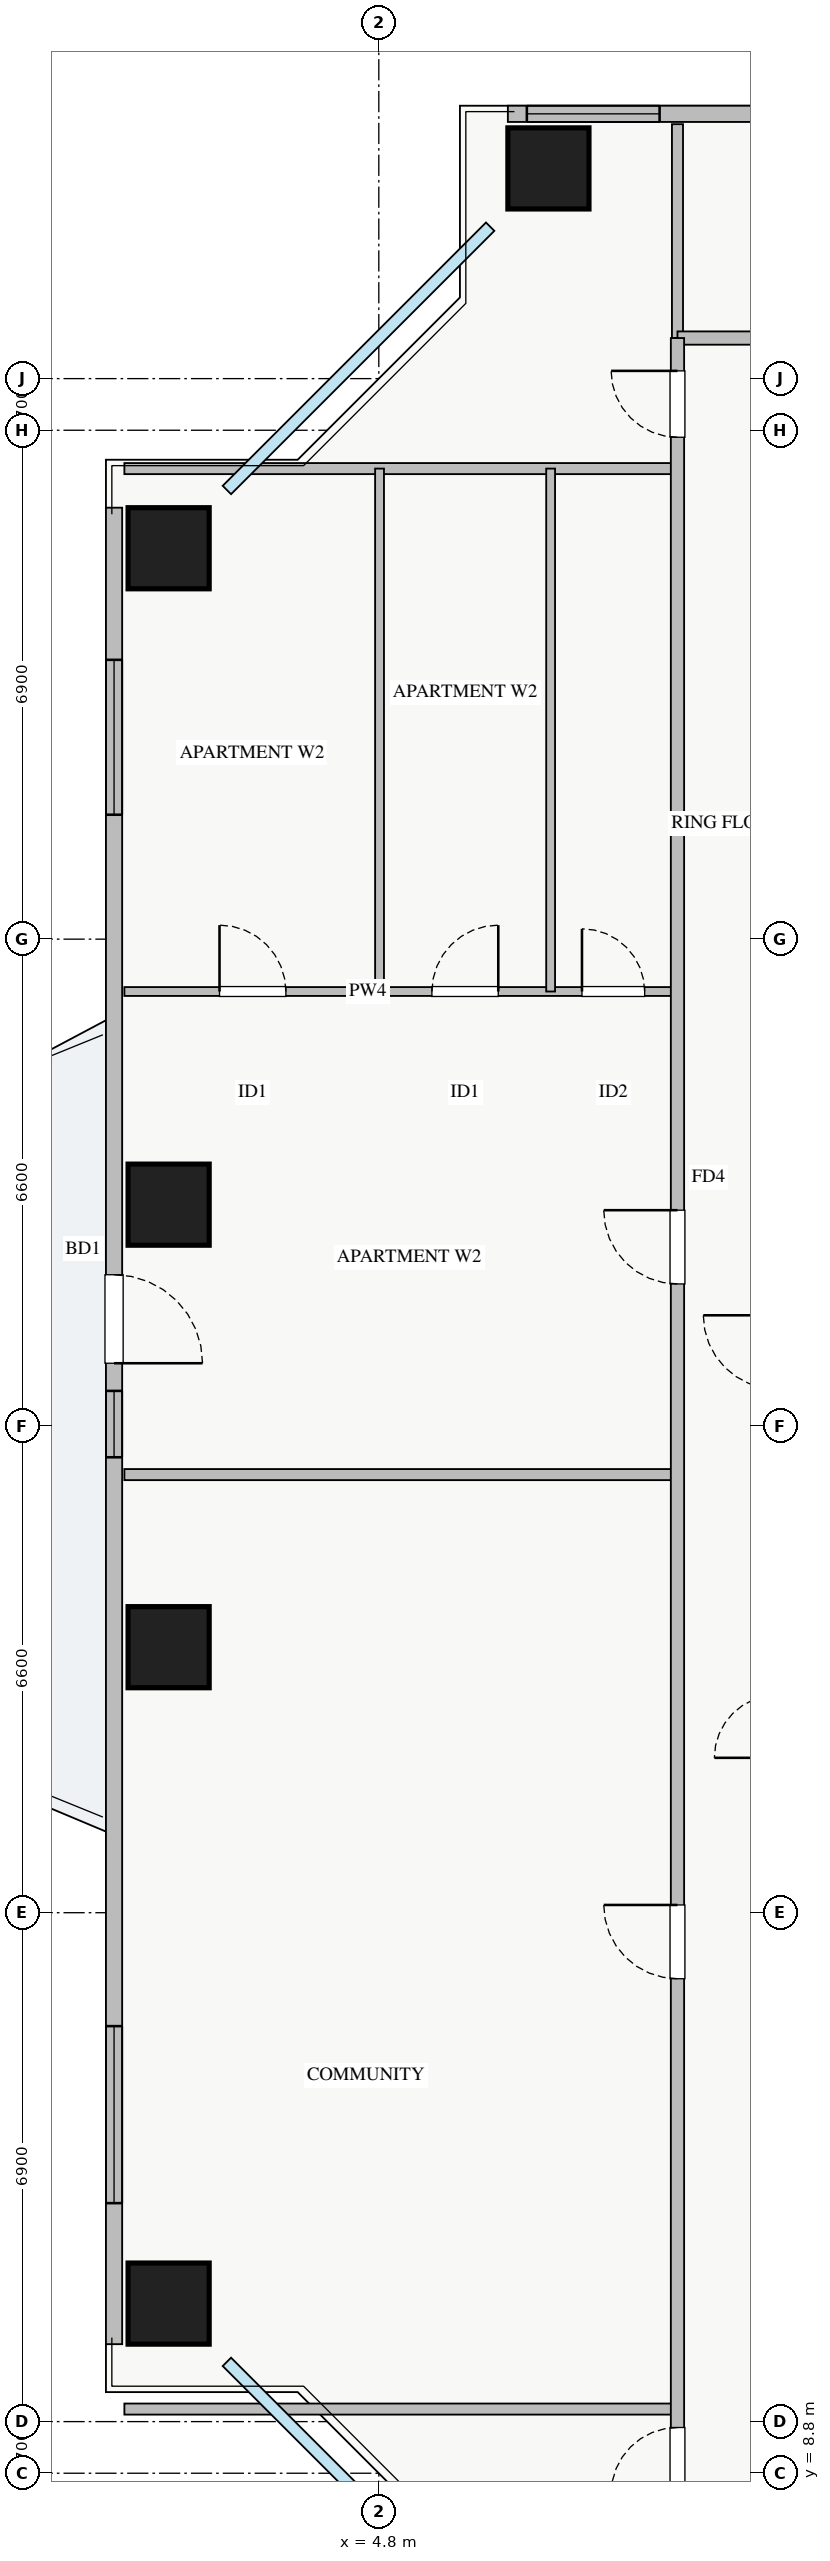
"""IFC4 building model, lengths in metres.
Left out: names, types, materials, properties, quantities, classifications, styles, units other than length and angle.
Written with IfcOpenShell. Run it as: python <this file> out.ifc"""

import sys

from ifc_helpers import new_model, si_unit, direction, frame, frame_2d, origin, origin_2d, place, context, subcontext, project, spatial, rectangle, extrude, source, transform, mapped, element, fill, save


model = new_model("IFC4")
c1 = context("Model", 3, precision=1e-05, world=origin(), true_north=direction((0.0, 1.0)))
c2 = subcontext(c1, "Body", "Model", "MODEL_VIEW")
j1 = project(units=[si_unit("LENGTHUNIT", "METRE"), si_unit("PLANEANGLEUNIT", "RADIAN")], contexts=[c1])
p1 = place(None, origin())
s1 = spatial("IfcSite", under=j1, at=p1, CompositionType="ELEMENT")
p2 = place(p1, origin())
s2 = spatial("IfcBuilding", under=s1, at=p2, CompositionType="ELEMENT")
p3 = place(p2, frame((0.0, 0.0, 116.5)))
s3 = spatial("IfcBuildingStorey", under=s2, at=p3, CompositionType="ELEMENT", Elevation=116.5)
m1 = source(origin(), c2, "Body", "SweptSolid", [
    extrude(rectangle(XDim=1.1, YDim=1.1, at=origin_2d()), origin(), (0.0, 0.0, 1.0), 3.25),
])
for number, where, z_axis, x_axis in (
    (1, (7.1, 40.05, 0.0), (0.0, 0.0, 1.0), (1.0, 0.0, 0.0)),
    (2, (1.95, 34.9, 0.0), (0.0, 0.0, 1.0), (1.0, 0.0, 0.0)),
    (3, (1.95, 26.0, 0.0), (0.0, 0.0, 1.0), (1.0, 0.0, 0.0)),
    (4, (1.95, 20.0, 0.0), (0.0, 0.0, 1.0), (1.0, 0.0, 0.0)),
    (5, (1.95, 11.1, 0.0), (0.0, 0.0, 1.0), (1.0, 0.0, 0.0)),
):
    element("IfcColumn", number, at=place(p3, frame(where, z_axis=z_axis, x_axis=x_axis)), inside=s3, PredefinedType="COLUMN", context=c2, shape_type="MappedRepresentation", body=[
        mapped(m1, transform((0.0, 0.0, 0.0), x_axis=(1.0, 0.0, 0.0), y_axis=(0.0, 1.0, 0.0), z_axis=(0.0, 0.0, 1.0), scale=1.0)),
    ])
p4 = place(p3, frame((6.55, 40.79, 0.0), z_axis=(0.0, 0.0, 1.0), x_axis=(1.0, 0.0, 0.0)))
e6 = element("IfcWall", 6, at=p4, inside=s3, PredefinedType="STANDARD", context=c2, shape_type="SweptSolid", body=[
    extrude(rectangle(XDim=24.9, YDim=0.22, at=frame_2d((12.45, 0.0))), origin(), (0.0, 0.0, 1.0), 2.61),
])
p5 = place(p4, frame((13.3, 0.0, 0.0)))
e7 = element("IfcOpeningElement", 7, at=p5, cuts=e6, PredefinedType="OPENING", context=c2, shape_type="SweptSolid", body=[
    extrude(rectangle(XDim=1.2, YDim=2.1, at=frame_2d((0.6, 1.05))), frame((0.0, 0.12, 0.0), z_axis=(0.0, -1.0, 0.0), x_axis=(1.0, 0.0, 0.0)), (0.0, 0.0, 1.0), 0.24),
])
p6 = place(p4, frame((3.635, 0.0, 0.9)))
e8 = element("IfcOpeningElement", 8, at=p6, cuts=e6, PredefinedType="OPENING", context=c2, shape_type="SweptSolid", body=[
    extrude(rectangle(XDim=2.4, YDim=1.5, at=frame_2d((1.2, 0.75))), frame((0.0, 0.12, 0.0), z_axis=(0.0, -1.0, 0.0), x_axis=(1.0, 0.0, 0.0)), (0.0, 0.0, 1.0), 0.24),
])
p7 = place(p4, frame((8.438, 0.0, 0.9)))
e9 = element("IfcOpeningElement", 9, at=p7, cuts=e6, PredefinedType="OPENING", context=c2, shape_type="SweptSolid", body=[
    extrude(rectangle(XDim=1.8, YDim=1.45, at=frame_2d((0.9, 0.725))), frame((0.0, 0.12, 0.0), z_axis=(0.0, -1.0, 0.0), x_axis=(1.0, 0.0, 0.0)), (0.0, 0.0, 1.0), 0.24),
])
p8 = place(p4, frame((14.813, 0.0, 0.9)))
e10 = element("IfcOpeningElement", 10, at=p8, cuts=e6, PredefinedType="OPENING", context=c2, shape_type="SweptSolid", body=[
    extrude(rectangle(XDim=1.5, YDim=1.45, at=frame_2d((0.75, 0.725))), frame((0.0, 0.12, 0.0), z_axis=(0.0, -1.0, 0.0), x_axis=(1.0, 0.0, 0.0)), (0.0, 0.0, 1.0), 0.24),
])
p9 = place(p4, frame((20.738, 0.0, 0.9)))
e11 = element("IfcOpeningElement", 11, at=p9, cuts=e6, PredefinedType="OPENING", context=c2, shape_type="SweptSolid", body=[
    extrude(rectangle(XDim=2.1, YDim=1.48, at=frame_2d((1.05, 0.74))), frame((0.0, 0.12, 0.0), z_axis=(0.0, -1.0, 0.0), x_axis=(1.0, 0.0, 0.0)), (0.0, 0.0, 1.0), 0.24),
])
p10 = place(p4, frame((0.258, 0.0, 0.9)))
e12 = element("IfcOpeningElement", 12, at=p10, cuts=e6, PredefinedType="OPENING", context=c2, shape_type="SweptSolid", body=[
    extrude(rectangle(XDim=1.8, YDim=1.5, at=frame_2d((0.9, 0.75))), frame((0.0, 0.12, 0.0), z_axis=(0.0, -1.0, 0.0), x_axis=(1.0, 0.0, 0.0)), (0.0, 0.0, 1.0), 0.24),
])
p11 = place(p3, frame((1.21, 10.55, 0.0), z_axis=(0.0, 0.0, 1.0), x_axis=(0.0, 1.0, 0.0)))
e13 = element("IfcWall", 13, at=p11, inside=s3, PredefinedType="STANDARD", context=c2, shape_type="SweptSolid", body=[
    extrude(rectangle(XDim=24.9, YDim=0.22, at=frame_2d((12.45, 0.0))), origin(), (0.0, 0.0, 1.0), 2.61),
])
p12 = place(p11, frame((13.3, 0.0, 0.0)))
e14 = element("IfcOpeningElement", 14, at=p12, cuts=e13, PredefinedType="OPENING", context=c2, shape_type="SweptSolid", body=[
    extrude(rectangle(XDim=1.2, YDim=2.1, at=frame_2d((0.6, 1.05))), frame((0.0, 0.12, 0.0), z_axis=(0.0, -1.0, 0.0), x_axis=(1.0, 0.0, 0.0)), (0.0, 0.0, 1.0), 0.24),
])
p13 = place(p11, frame((1.912, 0.0, 0.9)))
e15 = element("IfcOpeningElement", 15, at=p13, cuts=e13, PredefinedType="OPENING", context=c2, shape_type="SweptSolid", body=[
    extrude(rectangle(XDim=2.4, YDim=1.48, at=frame_2d((1.2, 0.74))), frame((0.0, 0.12, 0.0), z_axis=(0.0, -1.0, 0.0), x_axis=(1.0, 0.0, 0.0)), (0.0, 0.0, 1.0), 0.24),
])
p14 = place(p11, frame((20.737, 0.0, 0.9)))
e16 = element("IfcOpeningElement", 16, at=p14, cuts=e13, PredefinedType="OPENING", context=c2, shape_type="SweptSolid", body=[
    extrude(rectangle(XDim=2.1, YDim=1.48, at=frame_2d((1.05, 0.74))), frame((0.0, 0.12, 0.0), z_axis=(0.0, -1.0, 0.0), x_axis=(1.0, 0.0, 0.0)), (0.0, 0.0, 1.0), 0.24),
])
p15 = place(p11, frame((12.025, 0.0, 0.9)))
e17 = element("IfcOpeningElement", 17, at=p15, cuts=e13, PredefinedType="OPENING", context=c2, shape_type="SweptSolid", body=[
    extrude(rectangle(XDim=0.9, YDim=1.2, at=frame_2d((0.45, 0.6))), frame((0.0, 0.12, 0.0), z_axis=(0.0, -1.0, 0.0), x_axis=(1.0, 0.0, 0.0)), (0.0, 0.0, 1.0), 0.24),
])
p16 = place(p3, frame((8.85, 37.75, 0.0), z_axis=(0.0, 0.0, 1.0), x_axis=(0.0, 1.0, 0.0)))
e18 = element("IfcWall", 18, at=p16, inside=s3, PredefinedType="PARTITIONING", context=c2, shape_type="SweptSolid", body=[
    extrude(rectangle(XDim=2.9, YDim=0.15, at=frame_2d((1.45, 0.0))), origin(), (0.0, 0.0, 1.0), 3.07),
])
p17 = place(p3, frame((8.85, 37.75, 0.0), z_axis=(0.0, 0.0, 1.0), x_axis=(1.0, 0.0, 0.0)))
e19 = element("IfcWall", 19, at=p17, inside=s3, PredefinedType="PARTITIONING", context=c2, shape_type="SweptSolid", body=[
    extrude(rectangle(XDim=23.57, YDim=0.18, at=frame_2d((11.785, 0.0))), origin(), (0.0, 0.0, 1.0), 3.07),
])
p18 = place(p17, frame((2.035, 0.0, 0.0)))
e20 = element("IfcOpeningElement", 20, at=p18, cuts=e19, PredefinedType="OPENING", context=c2, shape_type="SweptSolid", body=[
    extrude(rectangle(XDim=1.0, YDim=2.05, at=frame_2d((0.5, 1.025))), frame((0.0, 0.1, 0.0), z_axis=(0.0, -1.0, 0.0), x_axis=(1.0, 0.0, 0.0)), (0.0, 0.0, 1.0), 0.2),
])
p19 = place(p17, frame((7.16, 0.0, 0.0)))
e21 = element("IfcOpeningElement", 21, at=p19, cuts=e19, PredefinedType="OPENING", context=c2, shape_type="SweptSolid", body=[
    extrude(rectangle(XDim=1.0, YDim=2.05, at=frame_2d((0.5, 1.025))), frame((0.0, 0.1, 0.0), z_axis=(0.0, -1.0, 0.0), x_axis=(1.0, 0.0, 0.0)), (0.0, 0.0, 1.0), 0.2),
])
p20 = place(p17, frame((13.3, 0.0, 0.0)))
e22 = element("IfcOpeningElement", 22, at=p20, cuts=e19, PredefinedType="OPENING", context=c2, shape_type="SweptSolid", body=[
    extrude(rectangle(XDim=1.0, YDim=2.05, at=frame_2d((0.5, 1.025))), frame((0.0, 0.1, 0.0), z_axis=(0.0, -1.0, 0.0), x_axis=(1.0, 0.0, 0.0)), (0.0, 0.0, 1.0), 0.2),
])
p21 = place(p17, frame((19.74, 0.0, 0.0)))
e23 = element("IfcOpeningElement", 23, at=p21, cuts=e19, PredefinedType="OPENING", context=c2, shape_type="SweptSolid", body=[
    extrude(rectangle(XDim=1.0, YDim=2.05, at=frame_2d((0.5, 1.025))), frame((0.0, 0.1, 0.0), z_axis=(0.0, -1.0, 0.0), x_axis=(1.0, 0.0, 0.0)), (0.0, 0.0, 1.0), 0.2),
])
for number, where, z_axis, x_axis in (
    (24, (1.35, 35.98, 0.0), (0.0, 0.0, 1.0), (1.0, 0.0, 0.0)),
    (25, (1.35, 9.67, 0.0), (0.0, 0.0, 1.0), (1.0, 0.0, 0.0)),
):
    element("IfcWall", number, at=place(p3, frame(where, z_axis=z_axis, x_axis=x_axis)), inside=s3, PredefinedType="PARTITIONING", context=c2, shape_type="SweptSolid", body=[
        extrude(rectangle(XDim=7.5, YDim=0.15, at=frame_2d((3.75, 0.0))), origin(), (0.0, 0.0, 1.0), 3.07),
    ])
p22 = place(p3, frame((1.35, 28.89, 0.0), z_axis=(0.0, 0.0, 1.0), x_axis=(1.0, 0.0, 0.0)))
e26 = element("IfcWall", 26, at=p22, inside=s3, PredefinedType="PLUMBINGWALL", context=c2, shape_type="SweptSolid", body=[
    extrude(rectangle(XDim=7.5, YDim=0.12, at=frame_2d((3.75, 0.0))), origin(), (0.0, 0.0, 1.0), 3.07),
])
p23 = place(p22, frame((1.29, 0.0, 0.0)))
e27 = element("IfcOpeningElement", 27, at=p23, cuts=e26, PredefinedType="OPENING", context=c2, shape_type="SweptSolid", body=[
    extrude(rectangle(XDim=0.9, YDim=2.05, at=frame_2d((0.45, 1.025))), frame((0.0, 0.07, 0.0), z_axis=(0.0, -1.0, 0.0), x_axis=(1.0, 0.0, 0.0)), (0.0, 0.0, 1.0), 0.14),
])
p24 = place(p22, frame((4.17, 0.0, 0.0)))
e28 = element("IfcOpeningElement", 28, at=p24, cuts=e26, PredefinedType="OPENING", context=c2, shape_type="SweptSolid", body=[
    extrude(rectangle(XDim=0.9, YDim=2.05, at=frame_2d((0.45, 1.025))), frame((0.0, 0.07, 0.0), z_axis=(0.0, -1.0, 0.0), x_axis=(1.0, 0.0, 0.0)), (0.0, 0.0, 1.0), 0.14),
])
p25 = place(p22, frame((6.205, 0.0, 0.0)))
e29 = element("IfcOpeningElement", 29, at=p25, cuts=e26, PredefinedType="OPENING", context=c2, shape_type="SweptSolid", body=[
    extrude(rectangle(XDim=0.85, YDim=2.05, at=frame_2d((0.425, 1.025))), frame((0.0, 0.07, 0.0), z_axis=(0.0, -1.0, 0.0), x_axis=(1.0, 0.0, 0.0)), (0.0, 0.0, 1.0), 0.14),
])
p26 = place(p3, frame((4.81, 28.89, 0.0), z_axis=(0.0, 0.0, 1.0), x_axis=(0.0, 1.0, 0.0)))
e30 = element("IfcWall", 30, at=p26, inside=s3, PredefinedType="PLUMBINGWALL", context=c2, shape_type="SweptSolid", body=[
    extrude(rectangle(XDim=7.09, YDim=0.12, at=frame_2d((3.545, 0.0))), origin(), (0.0, 0.0, 1.0), 3.07),
])
p27 = place(p3, frame((7.13, 28.89, 0.0), z_axis=(0.0, 0.0, 1.0), x_axis=(0.0, 1.0, 0.0)))
e31 = element("IfcWall", 31, at=p27, inside=s3, PredefinedType="PLUMBINGWALL", context=c2, shape_type="SweptSolid", body=[
    extrude(rectangle(XDim=7.09, YDim=0.12, at=frame_2d((3.545, 0.0))), origin(), (0.0, 0.0, 1.0), 2.577),
])
p28 = place(p3, frame((1.35, 22.34, 0.0), z_axis=(0.0, 0.0, 1.0), x_axis=(1.0, 0.0, 0.0)))
e32 = element("IfcWall", 32, at=p28, inside=s3, PredefinedType="PARTITIONING", context=c2, shape_type="SweptSolid", body=[
    extrude(rectangle(XDim=7.5, YDim=0.15, at=frame_2d((3.75, 0.0))), origin(), (0.0, 0.0, 1.0), 3.07),
])
p29 = place(p3, frame((8.85, 8.25, 0.0), z_axis=(0.0, 0.0, 1.0), x_axis=(0.0, 1.0, 0.0)))
e33 = element("IfcWall", 33, at=p29, inside=s3, PredefinedType="PARTITIONING", context=c2, shape_type="SweptSolid", body=[
    extrude(rectangle(XDim=29.5, YDim=0.18, at=frame_2d((14.75, 0.0))), origin(), (0.0, 0.0, 1.0), 3.07),
])
p30 = place(p29, frame((28.155, 0.0, 0.0)))
e34 = element("IfcOpeningElement", 34, at=p30, cuts=e33, PredefinedType="OPENING", context=c2, shape_type="SweptSolid", body=[
    extrude(rectangle(XDim=0.9, YDim=2.05, at=frame_2d((0.45, 1.025))), frame((0.0, 0.1, 0.0), z_axis=(0.0, -1.0, 0.0), x_axis=(1.0, 0.0, 0.0)), (0.0, 0.0, 1.0), 0.2),
])
p31 = place(p29, frame((0.27, 0.0, 0.0)))
e35 = element("IfcOpeningElement", 35, at=p31, cuts=e33, PredefinedType="OPENING", context=c2, shape_type="SweptSolid", body=[
    extrude(rectangle(XDim=0.9, YDim=2.05, at=frame_2d((0.45, 1.025))), frame((0.0, 0.1, 0.0), z_axis=(0.0, -1.0, 0.0), x_axis=(1.0, 0.0, 0.0)), (0.0, 0.0, 1.0), 0.2),
])
p32 = place(p29, frame((7.255, 0.0, 0.0)))
e36 = element("IfcOpeningElement", 36, at=p32, cuts=e33, PredefinedType="OPENING", context=c2, shape_type="SweptSolid", body=[
    extrude(rectangle(XDim=1.0, YDim=2.05, at=frame_2d((0.5, 1.025))), frame((0.0, 0.1, 0.0), z_axis=(0.0, -1.0, 0.0), x_axis=(1.0, 0.0, 0.0)), (0.0, 0.0, 1.0), 0.2),
])
p33 = place(p29, frame((16.675, 0.0, 0.0)))
e37 = element("IfcOpeningElement", 37, at=p33, cuts=e33, PredefinedType="OPENING", context=c2, shape_type="SweptSolid", body=[
    extrude(rectangle(XDim=1.0, YDim=2.05, at=frame_2d((0.5, 1.025))), frame((0.0, 0.1, 0.0), z_axis=(0.0, -1.0, 0.0), x_axis=(1.0, 0.0, 0.0)), (0.0, 0.0, 1.0), 0.2),
])
m2 = source(origin(), c2, "Body", "SweptSolid", [
    extrude(rectangle(XDim=1.2, YDim=2.1, at=frame_2d((0.6, 1.05))), frame((0.0, 0.025, 0.0), z_axis=(0.0, -1.0, 0.0), x_axis=(1.0, 0.0, 0.0)), (0.0, 0.0, 1.0), 0.05),
])
p34 = place(p12, frame((1.2, 0.0, 0.0), z_axis=(0.0, 0.0, 1.0), x_axis=(-1.0, 0.0, 0.0)))
e38 = element("IfcDoor", 38, at=p34, inside=s3, OperationType="SINGLE_SWING_LEFT", PredefinedType="DOOR", context=c2, shape_type="MappedRepresentation", body=[
    mapped(m2, transform((0.0, 0.0, 0.0), x_axis=(1.0, 0.0, 0.0), y_axis=(0.0, 1.0, 0.0), z_axis=(0.0, 0.0, 1.0), scale=1.0)),
])
fill(e14, e38)
m3 = source(origin(), c2, "Body", "SweptSolid", [
    extrude(rectangle(XDim=2.4, YDim=1.48, at=frame_2d((1.2, 0.74))), frame((0.0, 0.03, 0.0), z_axis=(0.0, -1.0, 0.0), x_axis=(1.0, 0.0, 0.0)), (0.0, 0.0, 1.0), 0.06),
])
p35 = place(p13, origin())
e39 = element("IfcWindow", 39, at=p35, inside=s3, PartitioningType="TRIPLE_PANEL_VERTICAL", PredefinedType="WINDOW", context=c2, shape_type="MappedRepresentation", body=[
    mapped(m3, transform((0.0, 0.0, 0.0), x_axis=(1.0, 0.0, 0.0), y_axis=(0.0, 1.0, 0.0), z_axis=(0.0, 0.0, 1.0), scale=1.0)),
])
fill(e15, e39)
m4 = source(origin(), c2, "Body", "SweptSolid", [
    extrude(rectangle(XDim=2.1, YDim=1.48, at=frame_2d((1.05, 0.74))), frame((0.0, 0.03, 0.0), z_axis=(0.0, -1.0, 0.0), x_axis=(1.0, 0.0, 0.0)), (0.0, 0.0, 1.0), 0.06),
])
p36 = place(p14, origin())
e40 = element("IfcWindow", 40, at=p36, inside=s3, PartitioningType="TRIPLE_PANEL_VERTICAL", PredefinedType="WINDOW", context=c2, shape_type="MappedRepresentation", body=[
    mapped(m4, transform((0.0, 0.0, 0.0), x_axis=(1.0, 0.0, 0.0), y_axis=(0.0, 1.0, 0.0), z_axis=(0.0, 0.0, 1.0), scale=1.0)),
])
fill(e16, e40)
m5 = source(origin(), c2, "Body", "SweptSolid", [
    extrude(rectangle(XDim=0.9, YDim=2.05, at=frame_2d((0.45, 1.025))), frame((0.0, 0.025, 0.0), z_axis=(0.0, -1.0, 0.0), x_axis=(1.0, 0.0, 0.0)), (0.0, 0.0, 1.0), 0.05),
])
p37 = place(p23, origin())
e41 = element("IfcDoor", 41, at=p37, inside=s3, OperationType="SINGLE_SWING_LEFT", PredefinedType="DOOR", context=c2, shape_type="MappedRepresentation", body=[
    mapped(m5, transform((0.0, 0.0, 0.0), x_axis=(1.0, 0.0, 0.0), y_axis=(0.0, 1.0, 0.0), z_axis=(0.0, 0.0, 1.0), scale=1.0)),
])
fill(e27, e41)
p38 = place(p24, origin())
e42 = element("IfcDoor", 42, at=p38, inside=s3, OperationType="SINGLE_SWING_RIGHT", PredefinedType="DOOR", context=c2, shape_type="MappedRepresentation", body=[
    mapped(m5, transform((0.0, 0.0, 0.0), x_axis=(1.0, 0.0, 0.0), y_axis=(0.0, 1.0, 0.0), z_axis=(0.0, 0.0, 1.0), scale=1.0)),
])
fill(e28, e42)
m6 = source(origin(), c2, "Body", "SweptSolid", [
    extrude(rectangle(XDim=0.85, YDim=2.05, at=frame_2d((0.425, 1.025))), frame((0.0, 0.025, 0.0), z_axis=(0.0, -1.0, 0.0), x_axis=(1.0, 0.0, 0.0)), (0.0, 0.0, 1.0), 0.05),
])
p39 = place(p25, origin())
e43 = element("IfcDoor", 43, at=p39, inside=s3, OperationType="SINGLE_SWING_LEFT", PredefinedType="DOOR", context=c2, shape_type="MappedRepresentation", body=[
    mapped(m6, transform((0.0, 0.0, 0.0), x_axis=(1.0, 0.0, 0.0), y_axis=(0.0, 1.0, 0.0), z_axis=(0.0, 0.0, 1.0), scale=1.0)),
])
fill(e29, e43)
p40 = place(p30, origin())
e44 = element("IfcDoor", 44, at=p40, inside=s3, OperationType="SINGLE_SWING_RIGHT", PredefinedType="DOOR", context=c2, shape_type="MappedRepresentation", body=[
    mapped(m5, transform((0.0, 0.0, 0.0), x_axis=(1.0, 0.0, 0.0), y_axis=(0.0, 1.0, 0.0), z_axis=(0.0, 0.0, 1.0), scale=1.0)),
])
fill(e34, e44)
p41 = place(p31, origin())
e45 = element("IfcDoor", 45, at=p41, inside=s3, OperationType="SINGLE_SWING_LEFT", PredefinedType="DOOR", context=c2, shape_type="MappedRepresentation", body=[
    mapped(m5, transform((0.0, 0.0, 0.0), x_axis=(1.0, 0.0, 0.0), y_axis=(0.0, 1.0, 0.0), z_axis=(0.0, 0.0, 1.0), scale=1.0)),
])
fill(e35, e45)
m7 = source(origin(), c2, "Body", "SweptSolid", [
    extrude(rectangle(XDim=1.0, YDim=2.05, at=frame_2d((0.5, 1.025))), frame((0.0, 0.025, 0.0), z_axis=(0.0, -1.0, 0.0), x_axis=(1.0, 0.0, 0.0)), (0.0, 0.0, 1.0), 0.05),
])
p42 = place(p32, origin())
e46 = element("IfcDoor", 46, at=p42, inside=s3, OperationType="SINGLE_SWING_RIGHT", PredefinedType="DOOR", context=c2, shape_type="MappedRepresentation", body=[
    mapped(m7, transform((0.0, 0.0, 0.0), x_axis=(1.0, 0.0, 0.0), y_axis=(0.0, 1.0, 0.0), z_axis=(0.0, 0.0, 1.0), scale=1.0)),
])
fill(e36, e46)
p43 = place(p33, origin())
e47 = element("IfcDoor", 47, at=p43, inside=s3, OperationType="SINGLE_SWING_RIGHT", PredefinedType="DOOR", context=c2, shape_type="MappedRepresentation", body=[
    mapped(m7, transform((0.0, 0.0, 0.0), x_axis=(1.0, 0.0, 0.0), y_axis=(0.0, 1.0, 0.0), z_axis=(0.0, 0.0, 1.0), scale=1.0)),
])
fill(e37, e47)
m8 = source(origin(), c2, "Body", "SweptSolid", [
    extrude(rectangle(XDim=1.8, YDim=1.5, at=frame_2d((0.9, 0.75))), frame((0.0, 0.03, 0.0), z_axis=(0.0, -1.0, 0.0), x_axis=(1.0, 0.0, 0.0)), (0.0, 0.0, 1.0), 0.06),
])
p44 = place(p10, origin())
e48 = element("IfcWindow", 48, at=p44, inside=s3, PartitioningType="DOUBLE_PANEL_VERTICAL", PredefinedType="WINDOW", context=c2, shape_type="MappedRepresentation", body=[
    mapped(m8, transform((0.0, 0.0, 0.0), x_axis=(1.0, 0.0, 0.0), y_axis=(0.0, 1.0, 0.0), z_axis=(0.0, 0.0, 1.0), scale=1.0)),
])
fill(e12, e48)
m9 = source(origin(), c2, "Body", "SweptSolid", [
    extrude(rectangle(XDim=0.9, YDim=1.2, at=frame_2d((0.45, 0.6))), frame((0.0, 0.03, 0.0), z_axis=(0.0, -1.0, 0.0), x_axis=(1.0, 0.0, 0.0)), (0.0, 0.0, 1.0), 0.06),
])
p45 = place(p15, origin())
e49 = element("IfcWindow", 49, at=p45, inside=s3, PartitioningType="SINGLE_PANEL", PredefinedType="WINDOW", context=c2, shape_type="MappedRepresentation", body=[
    mapped(m9, transform((0.0, 0.0, 0.0), x_axis=(1.0, 0.0, 0.0), y_axis=(0.0, 1.0, 0.0), z_axis=(0.0, 0.0, 1.0), scale=1.0)),
])
fill(e17, e49)
save(model, sys.argv[1])
